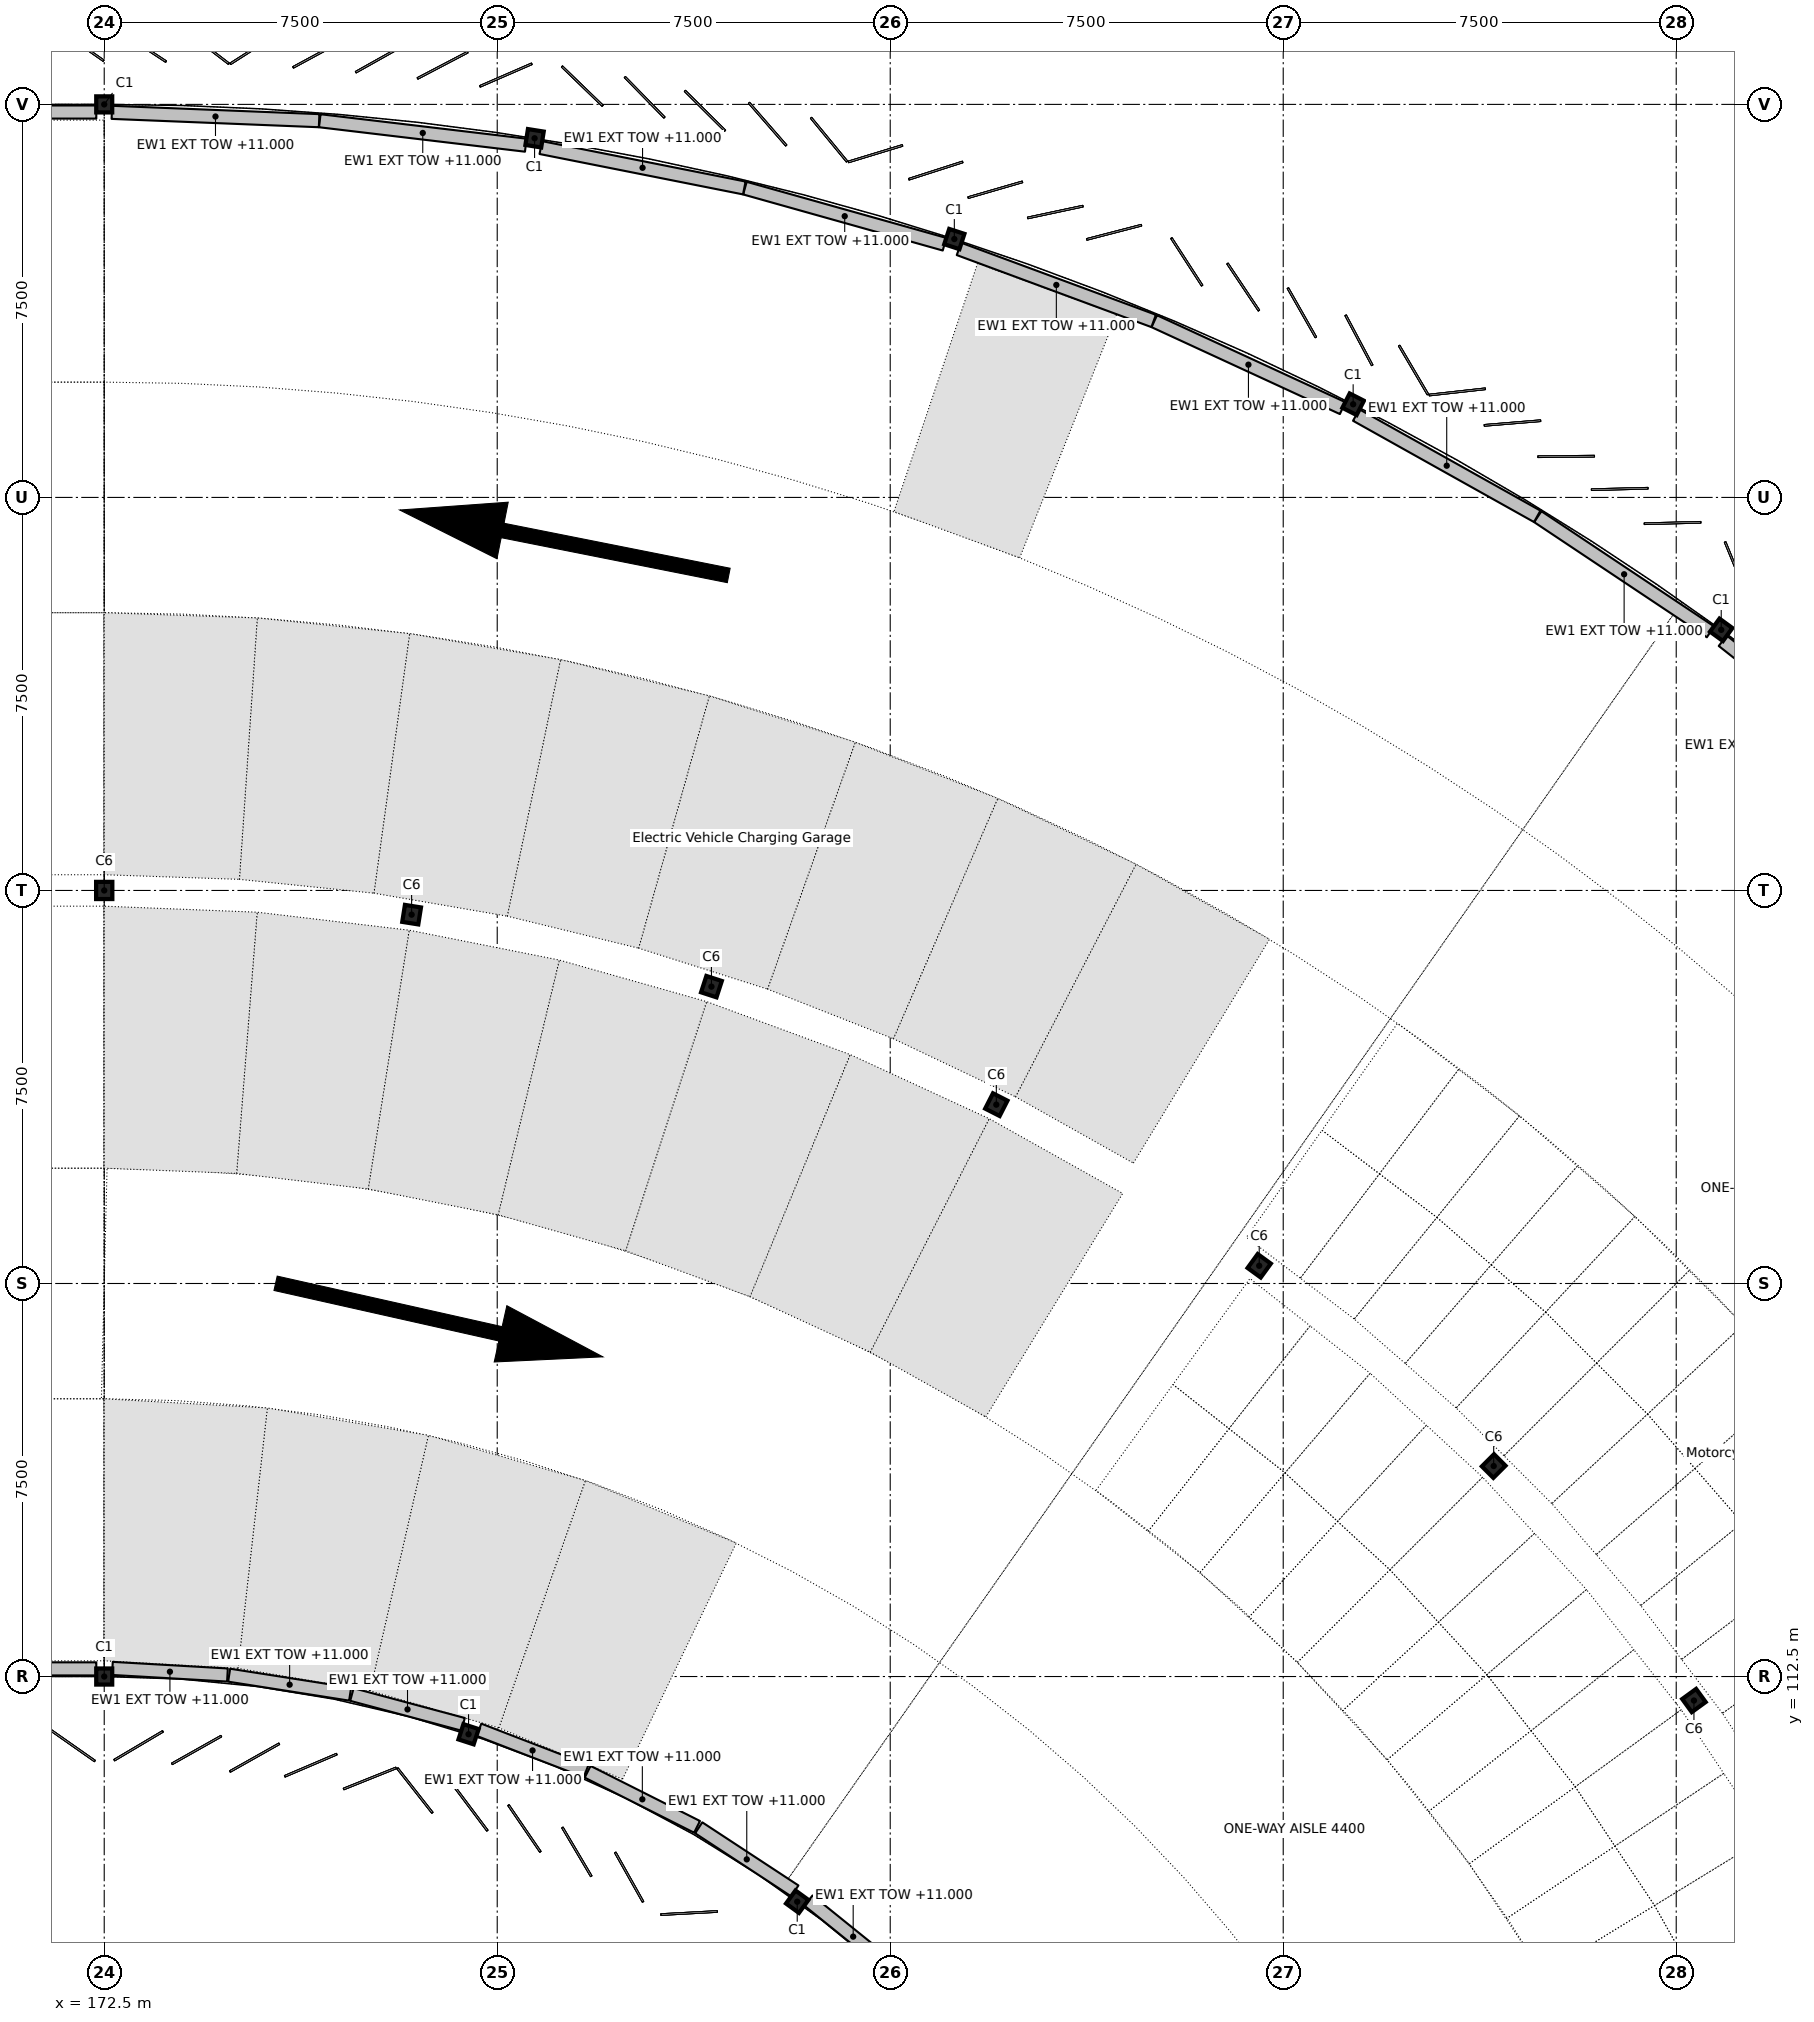
"""IFC4 building model, lengths in metres.
Left out: names, types, materials, properties, quantities, classifications, styles, units other than length and angle.
Written with IfcOpenShell. Run it as: python <this file> out.ifc"""

import sys

from ifc_helpers import new_model, si_unit, direction, frame, frame_2d, origin, origin_2d, place, context, subcontext, project, spatial, rectangle, i_section, extrude, element, save


model = new_model("IFC4")
c1 = context("Model", 3, precision=1e-05, world=origin(), true_north=direction((0.0, 1.0)))
c2 = subcontext(c1, "Body", "Model", "MODEL_VIEW")
j1 = project(units=[si_unit("LENGTHUNIT", "METRE"), si_unit("PLANEANGLEUNIT", "RADIAN")], contexts=[c1])
p1 = place(None, origin())
s1 = spatial("IfcSite", under=j1, at=p1, CompositionType="ELEMENT")
p2 = place(p1, origin())
s2 = spatial("IfcBuilding", under=s1, at=p2, CompositionType="ELEMENT")
p3 = place(p2, frame((0.0, 0.0, 9.9)))
s3 = spatial("IfcBuildingStorey", under=s2, at=p3, CompositionType="ELEMENT", Elevation=9.9)
p4 = place(p3, frame((172.5, 112.5, 0.0), z_axis=(0.0, 0.0, 1.0), x_axis=(1.0, 0.0, 0.0)))
e1 = element("IfcColumn", 1, at=p4, inside=s3, PredefinedType="COLUMN", context=c2, shape_type="SweptSolid", body=[
    extrude(i_section(OverallWidth=0.305, OverallDepth=0.307, WebThickness=0.01, FlangeThickness=0.015, FilletRadius=0.015, at=origin_2d()), origin(), (0.0, 0.0, 1.0), 3.3),
])
p5 = place(p3, frame((172.5, 127.5, 0.0), z_axis=(0.0, 0.0, 1.0), x_axis=(1.0, 0.0, 0.0)))
e2 = element("IfcColumn", 2, at=p5, inside=s3, PredefinedType="COLUMN", context=c2, shape_type="SweptSolid", body=[
    extrude(i_section(OverallWidth=0.31, OverallDepth=0.328, WebThickness=0.015, FlangeThickness=0.025, FilletRadius=0.015, at=origin_2d()), origin(), (0.0, 0.0, 1.0), 3.3),
])
for number, where, z_axis, x_axis in (
    (3, (172.5, 142.5, 0.0), (0.0, 0.0, 1.0), (1.0, 0.0, 0.0)),
    (4, (179.453, 111.399, 0.0), (0.0, 0.0, 1.0), (-0.951, 0.309, 0.0)),
    (5, (185.725, 108.203, 0.0), (0.0, 0.0, 1.0), (-0.809, 0.588, 0.0)),
):
    element("IfcColumn", number, at=place(p3, frame(where, z_axis=z_axis, x_axis=x_axis)), inside=s3, PredefinedType="COLUMN", context=c2, shape_type="SweptSolid", body=[
        extrude(i_section(OverallWidth=0.305, OverallDepth=0.307, WebThickness=0.01, FlangeThickness=0.015, FilletRadius=0.015, at=origin_2d()), origin(), (0.0, 0.0, 1.0), 3.3),
    ])
for number, where, z_axis, x_axis in (
    (6, (178.366, 127.038, 0.0), (0.0, 0.0, 1.0), (-0.988, 0.156, 0.0)),
    (7, (184.088, 125.665, 0.0), (0.0, 0.0, 1.0), (-0.951, 0.309, 0.0)),
    (8, (189.525, 123.413, 0.0), (0.0, 0.0, 1.0), (-0.891, 0.454, 0.0)),
    (9, (194.542, 120.338, 0.0), (0.0, 0.0, 1.0), (-0.809, 0.588, 0.0)),
    (10, (199.017, 116.517, 0.0), (0.0, 0.0, 1.0), (-0.707, 0.707, 0.0)),
    (11, (202.838, 112.042, 0.0), (0.0, 0.0, 1.0), (-0.588, 0.809, 0.0)),
):
    element("IfcColumn", number, at=place(p3, frame(where, z_axis=z_axis, x_axis=x_axis)), inside=s3, PredefinedType="COLUMN", context=c2, shape_type="SweptSolid", body=[
        extrude(i_section(OverallWidth=0.31, OverallDepth=0.328, WebThickness=0.015, FlangeThickness=0.025, FilletRadius=0.015, at=origin_2d()), origin(), (0.0, 0.0, 1.0), 3.3),
    ])
for number, where, z_axis, x_axis in (
    (12, (180.713, 141.854, 0.0), (0.0, 0.0, 1.0), (-0.988, 0.156, 0.0)),
    (13, (188.723, 139.93, 0.0), (0.0, 0.0, 1.0), (-0.951, 0.309, 0.0)),
    (14, (196.334, 136.778, 0.0), (0.0, 0.0, 1.0), (-0.891, 0.454, 0.0)),
    (15, (203.359, 132.473, 0.0), (0.0, 0.0, 1.0), (-0.809, 0.588, 0.0)),
):
    element("IfcColumn", number, at=place(p3, frame(where, z_axis=z_axis, x_axis=x_axis)), inside=s3, PredefinedType="COLUMN", context=c2, shape_type="SweptSolid", body=[
        extrude(i_section(OverallWidth=0.305, OverallDepth=0.307, WebThickness=0.01, FlangeThickness=0.015, FilletRadius=0.015, at=origin_2d()), origin(), (0.0, 0.0, 1.0), 3.3),
    ])
p6 = place(p3, frame((165.152, 112.646, 0.0), z_axis=(0.0, 0.0, 1.0), x_axis=(1.0, 0.0, 0.0)))
e16 = element("IfcWall", 16, at=p6, inside=s3, PredefinedType="SOLIDWALL", context=c2, shape_type="SweptSolid", body=[
    extrude(rectangle(XDim=7.197, YDim=0.25, at=frame_2d((3.598, 0.0))), origin(), (0.0, 0.0, 1.0), 1.1),
])
p7 = place(p3, frame((172.656, 112.655, 0.0), z_axis=(0.0, 0.0, 1.0), x_axis=(0.998364643885, -0.057166754681, 0.0)))
e17 = element("IfcWall", 17, at=p7, inside=s3, PredefinedType="SOLIDWALL", context=c2, shape_type="SweptSolid", body=[
    extrude(rectangle(XDim=2.199, YDim=0.25, at=frame_2d((1.1, 0.0))), origin(), (0.0, 0.0, 1.0), 1.1),
])
p8 = place(p3, frame((174.884, 112.525, 0.0), z_axis=(0.0, 0.0, 1.0), x_axis=(0.987958694972, -0.154717862668, 0.0)))
e18 = element("IfcWall", 18, at=p8, inside=s3, PredefinedType="SOLIDWALL", context=c2, shape_type="SweptSolid", body=[
    extrude(rectangle(XDim=2.337, YDim=0.25, at=frame_2d((1.168, 0.0))), origin(), (0.0, 0.0, 1.0), 1.1),
])
p9 = place(p3, frame((177.227, 112.156, 0.0), z_axis=(0.0, 0.0, 1.0), x_axis=(0.965933668704, -0.258789775039, 0.0)))
e19 = element("IfcWall", 19, at=p9, inside=s3, PredefinedType="SOLIDWALL", context=c2, shape_type="SweptSolid", body=[
    extrude(rectangle(XDim=2.197, YDim=0.25, at=frame_2d((1.099, 0.0))), origin(), (0.0, 0.0, 1.0), 1.1),
])
p10 = place(p3, frame((179.652, 111.484, 0.0), z_axis=(0.0, 0.0, 1.0), x_axis=(0.933015016795, -0.359837433343, 0.0)))
e20 = element("IfcWall", 20, at=p10, inside=s3, PredefinedType="SOLIDWALL", context=c2, shape_type="SweptSolid", body=[
    extrude(rectangle(XDim=2.191, YDim=0.25, at=frame_2d((1.096, 0.0))), origin(), (0.0, 0.0, 1.0), 1.1),
])
p11 = place(p3, frame((181.725, 110.682, 0.0), z_axis=(0.0, 0.0, 1.0), x_axis=(0.89321234847, -0.449635074856, 0.0)))
e21 = element("IfcWall", 21, at=p11, inside=s3, PredefinedType="SOLIDWALL", context=c2, shape_type="SweptSolid", body=[
    extrude(rectangle(XDim=2.337, YDim=0.25, at=frame_2d((1.169, 0.0))), origin(), (0.0, 0.0, 1.0), 1.1),
])
p12 = place(p3, frame((183.845, 109.613, 0.0), z_axis=(0.0, 0.0, 1.0), x_axis=(0.835931493831, -0.548833797813, 0.0)))
e22 = element("IfcWall", 22, at=p12, inside=s3, PredefinedType="SOLIDWALL", context=c2, shape_type="SweptSolid", body=[
    extrude(rectangle(XDim=2.195, YDim=0.25, at=frame_2d((1.097, 0.0))), origin(), (0.0, 0.0, 1.0), 1.1),
])
p13 = place(p3, frame((185.94, 108.225, 0.0), z_axis=(0.0, 0.0, 1.0), x_axis=(0.7781901536, -0.628028729311, 0.0)))
e23 = element("IfcWall", 23, at=p13, inside=s3, PredefinedType="SOLIDWALL", context=c2, shape_type="SweptSolid", body=[
    extrude(rectangle(XDim=2.193, YDim=0.25, at=frame_2d((1.097, 0.0))), origin(), (0.0, 0.0, 1.0), 1.1),
])
p14 = place(p3, frame((206.494, 129.811, 0.0), z_axis=(0.0, 0.0, 1.0), x_axis=(-0.784694773209, 0.619882337946, 0.0)))
e24 = element("IfcWall", 24, at=p14, inside=s3, PredefinedType="SOLIDWALL", context=c2, shape_type="SweptSolid", body=[
    extrude(rectangle(XDim=3.957, YDim=0.25, at=frame_2d((1.978, 0.0))), origin(), (0.0, 0.0, 1.0), 1.1),
])
p15 = place(p3, frame((203.154, 132.435, 0.0), z_axis=(0.0, 0.0, 1.0), x_axis=(-0.83203132877, 0.554728643524, 0.0)))
e25 = element("IfcWall", 25, at=p15, inside=s3, PredefinedType="SOLIDWALL", context=c2, shape_type="SweptSolid", body=[
    extrude(rectangle(XDim=3.961, YDim=0.25, at=frame_2d((1.98, 0.0))), origin(), (0.0, 0.0, 1.0), 1.1),
])
p16 = place(p3, frame((199.847, 134.639, 0.0), z_axis=(0.0, 0.0, 1.0), x_axis=(-0.872675295028, 0.488300961957, 0.0)))
e26 = element("IfcWall", 26, at=p16, inside=s3, PredefinedType="SOLIDWALL", context=c2, shape_type="SweptSolid", body=[
    extrude(rectangle(XDim=3.958, YDim=0.25, at=frame_2d((1.979, 0.0))), origin(), (0.0, 0.0, 1.0), 1.1),
])
p17 = place(p3, frame((196.133, 136.704, 0.0), z_axis=(0.0, 0.0, 1.0), x_axis=(-0.907988262617, 0.418995602542, 0.0)))
e27 = element("IfcWall", 27, at=p17, inside=s3, PredefinedType="SOLIDWALL", context=c2, shape_type="SweptSolid", body=[
    extrude(rectangle(XDim=3.959, YDim=0.25, at=frame_2d((1.979, 0.0))), origin(), (0.0, 0.0, 1.0), 1.1),
])
p18 = place(p3, frame((192.527, 138.367, 0.0), z_axis=(0.0, 0.0, 1.0), x_axis=(-0.93784539105, 0.347053342422, 0.0)))
e28 = element("IfcWall", 28, at=p18, inside=s3, PredefinedType="SOLIDWALL", context=c2, shape_type="SweptSolid", body=[
    extrude(rectangle(XDim=3.96, YDim=0.25, at=frame_2d((1.98, 0.0))), origin(), (0.0, 0.0, 1.0), 1.1),
])
p19 = place(p3, frame((188.536, 139.832, 0.0), z_axis=(0.0, 0.0, 1.0), x_axis=(-0.962732314644, 0.270456078393, 0.0)))
e29 = element("IfcWall", 29, at=p19, inside=s3, PredefinedType="SOLIDWALL", context=c2, shape_type="SweptSolid", body=[
    extrude(rectangle(XDim=3.957, YDim=0.25, at=frame_2d((1.978, 0.0))), origin(), (0.0, 0.0, 1.0), 1.1),
])
p20 = place(p3, frame((184.715, 140.905, 0.0), z_axis=(0.0, 0.0, 1.0), x_axis=(-0.980850156695, 0.194763882975, 0.0)))
e30 = element("IfcWall", 30, at=p20, inside=s3, PredefinedType="SOLIDWALL", context=c2, shape_type="SweptSolid", body=[
    extrude(rectangle(XDim=3.959, YDim=0.25, at=frame_2d((1.979, 0.0))), origin(), (0.0, 0.0, 1.0), 1.1),
])
p21 = place(p3, frame((180.544, 141.721, 0.0), z_axis=(0.0, 0.0, 1.0), x_axis=(-0.993030098497, 0.117861034608, 0.0)))
e31 = element("IfcWall", 31, at=p21, inside=s3, PredefinedType="SOLIDWALL", context=c2, shape_type="SweptSolid", body=[
    extrude(rectangle(XDim=3.958, YDim=0.25, at=frame_2d((1.979, 0.0))), origin(), (0.0, 0.0, 1.0), 1.1),
])
p22 = place(p3, frame((176.601, 142.189, 0.0), z_axis=(0.0, 0.0, 1.0), x_axis=(-0.999191275027, 0.040209400773, 0.0)))
e32 = element("IfcWall", 32, at=p22, inside=s3, PredefinedType="SOLIDWALL", context=c2, shape_type="SweptSolid", body=[
    extrude(rectangle(XDim=3.959, YDim=0.25, at=frame_2d((1.979, 0.0))), origin(), (0.0, 0.0, 1.0), 1.1),
])
p23 = place(p3, frame((172.348, 142.354, 0.0), z_axis=(0.0, 0.0, 1.0), x_axis=(-1.0, 0.0, 0.0)))
e33 = element("IfcWall", 33, at=p23, inside=s3, PredefinedType="SOLIDWALL", context=c2, shape_type="SweptSolid", body=[
    extrude(rectangle(XDim=7.197, YDim=0.25, at=frame_2d((3.598, 0.0))), origin(), (0.0, 0.0, 1.0), 1.1),
])
save(model, sys.argv[1])
